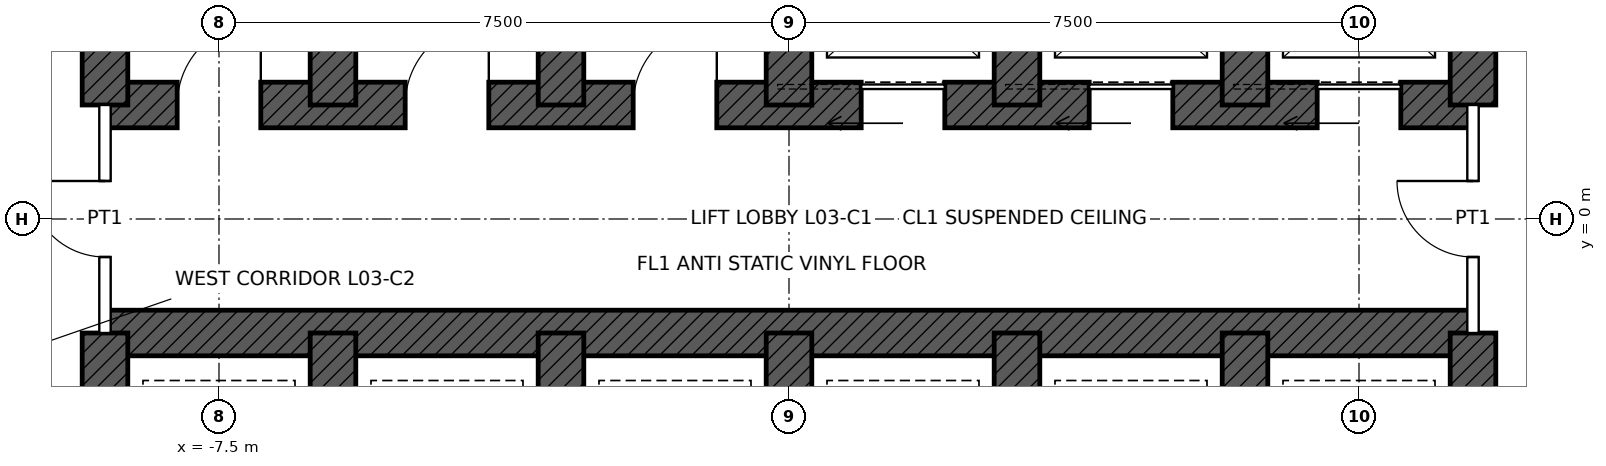
"""IFC4 building model, lengths in metres.
Left out: names, types, materials, properties, quantities, classifications, styles, units other than length and angle.
Written with IfcOpenShell. Run it as: python <this file> out.ifc"""

import sys

from ifc_helpers import new_model, si_unit, direction, frame, frame_2d, origin, place, context, subcontext, project, spatial, rectangle, extrude, element, fill, save


model = new_model("IFC4")
c1 = context("Model", 3, precision=1e-05, world=origin(), true_north=direction((0.0, 1.0)))
c2 = subcontext(c1, "Body", "Model", "MODEL_VIEW")
j1 = project(units=[si_unit("LENGTHUNIT", "METRE"), si_unit("PLANEANGLEUNIT", "RADIAN")], contexts=[c1])
p1 = place(None, origin())
s1 = spatial("IfcSite", under=j1, at=p1, CompositionType="ELEMENT")
p2 = place(p1, origin())
s2 = spatial("IfcBuilding", under=s1, at=p2, CompositionType="ELEMENT")
p3 = place(p2, frame((0.0, 0.0, 18.0)))
s3 = spatial("IfcBuildingStorey", under=s2, at=p3, CompositionType="ELEMENT", Elevation=18.0)
p4 = place(p3, frame((-9.0, 1.5, 0.0), z_axis=(0.0, 0.0, 1.0), x_axis=(1.0, 0.0, 0.0)))
e1 = element("IfcWall", 1, at=p4, inside=s3, PredefinedType="SHEAR", context=c2, shape_type="SweptSolid", body=[
    extrude(rectangle(XDim=18.0, YDim=0.6, at=frame_2d((9.0, 0.0))), origin(), (0.0, 0.0, 1.0), 5.4),
])
p5 = place(p4, frame((9.95, 0.0, 0.0)))
e2 = element("IfcOpeningElement", 2, at=p5, cuts=e1, PredefinedType="OPENING", context=c2, shape_type="SweptSolid", body=[
    extrude(rectangle(XDim=1.1, YDim=2.1, at=frame_2d((0.55, 1.05))), frame((0.0, 0.31, 0.0), z_axis=(0.0, -1.0, 0.0), x_axis=(1.0, 0.0, 0.0)), (0.0, 0.0, 1.0), 0.62),
])
p6 = place(p4, frame((12.95, 0.0, 0.0)))
e3 = element("IfcOpeningElement", 3, at=p6, cuts=e1, PredefinedType="OPENING", context=c2, shape_type="SweptSolid", body=[
    extrude(rectangle(XDim=1.1, YDim=2.1, at=frame_2d((0.55, 1.05))), frame((0.0, 0.31, 0.0), z_axis=(0.0, -1.0, 0.0), x_axis=(1.0, 0.0, 0.0)), (0.0, 0.0, 1.0), 0.62),
])
p7 = place(p4, frame((15.95, 0.0, 0.0)))
e4 = element("IfcOpeningElement", 4, at=p7, cuts=e1, PredefinedType="OPENING", context=c2, shape_type="SweptSolid", body=[
    extrude(rectangle(XDim=1.1, YDim=2.1, at=frame_2d((0.55, 1.05))), frame((0.0, 0.31, 0.0), z_axis=(0.0, -1.0, 0.0), x_axis=(1.0, 0.0, 0.0)), (0.0, 0.0, 1.0), 0.62),
])
p8 = place(p4, frame((0.95, 0.0, 0.0)))
e5 = element("IfcOpeningElement", 5, at=p8, cuts=e1, PredefinedType="OPENING", context=c2, shape_type="SweptSolid", body=[
    extrude(rectangle(XDim=1.1, YDim=2.1, at=frame_2d((0.55, 1.05))), frame((0.0, 0.31, 0.0), z_axis=(0.0, -1.0, 0.0), x_axis=(1.0, 0.0, 0.0)), (0.0, 0.0, 1.0), 0.62),
])
p9 = place(p4, frame((3.95, 0.0, 0.0)))
e6 = element("IfcOpeningElement", 6, at=p9, cuts=e1, PredefinedType="OPENING", context=c2, shape_type="SweptSolid", body=[
    extrude(rectangle(XDim=1.1, YDim=2.1, at=frame_2d((0.55, 1.05))), frame((0.0, 0.31, 0.0), z_axis=(0.0, -1.0, 0.0), x_axis=(1.0, 0.0, 0.0)), (0.0, 0.0, 1.0), 0.62),
])
p10 = place(p4, frame((6.95, 0.0, 0.0)))
e7 = element("IfcOpeningElement", 7, at=p10, cuts=e1, PredefinedType="OPENING", context=c2, shape_type="SweptSolid", body=[
    extrude(rectangle(XDim=1.1, YDim=2.1, at=frame_2d((0.55, 1.05))), frame((0.0, 0.31, 0.0), z_axis=(0.0, -1.0, 0.0), x_axis=(1.0, 0.0, 0.0)), (0.0, 0.0, 1.0), 0.62),
])
p11 = place(p3, frame((-9.0, -1.5, 0.0), z_axis=(0.0, 0.0, 1.0), x_axis=(1.0, 0.0, 0.0)))
e8 = element("IfcWall", 8, at=p11, inside=s3, PredefinedType="SHEAR", context=c2, shape_type="SweptSolid", body=[
    extrude(rectangle(XDim=18.0, YDim=0.6, at=frame_2d((9.0, 0.0))), origin(), (0.0, 0.0, 1.0), 5.4),
])
for number, where, z_axis, x_axis in (
    (9, (-9.0, 1.5, 0.0), (0.0, 0.0, 1.0), (0.0, 1.0, 0.0)),
    (10, (9.0, 1.5, 0.0), (0.0, 0.0, 1.0), (0.0, 1.0, 0.0)),
    (11, (-9.0, -4.5, 0.0), (0.0, 0.0, 1.0), (0.0, 1.0, 0.0)),
    (12, (9.0, -4.5, 0.0), (0.0, 0.0, 1.0), (0.0, 1.0, 0.0)),
    (13, (-6.0, 1.5, 0.0), (0.0, 0.0, 1.0), (0.0, 1.0, 0.0)),
    (14, (-3.0, 1.5, 0.0), (0.0, 0.0, 1.0), (0.0, 1.0, 0.0)),
    (15, (0.0, 1.5, 0.0), (0.0, 0.0, 1.0), (0.0, 1.0, 0.0)),
    (16, (3.0, 1.5, 0.0), (0.0, 0.0, 1.0), (0.0, 1.0, 0.0)),
    (17, (6.0, 1.5, 0.0), (0.0, 0.0, 1.0), (0.0, 1.0, 0.0)),
    (18, (-6.0, -4.5, 0.0), (0.0, 0.0, 1.0), (0.0, 1.0, 0.0)),
    (19, (-3.0, -4.5, 0.0), (0.0, 0.0, 1.0), (0.0, 1.0, 0.0)),
    (20, (0.0, -4.5, 0.0), (0.0, 0.0, 1.0), (0.0, 1.0, 0.0)),
    (21, (3.0, -4.5, 0.0), (0.0, 0.0, 1.0), (0.0, 1.0, 0.0)),
    (22, (6.0, -4.5, 0.0), (0.0, 0.0, 1.0), (0.0, 1.0, 0.0)),
):
    element("IfcWall", number, at=place(p3, frame(where, z_axis=z_axis, x_axis=x_axis)), inside=s3, PredefinedType="SHEAR", context=c2, shape_type="SweptSolid", body=[
        extrude(rectangle(XDim=3.0, YDim=0.6, at=frame_2d((1.5, 0.0))), origin(), (0.0, 0.0, 1.0), 5.4),
    ])
p12 = place(p3, frame((-9.0, -1.5, 0.0), z_axis=(0.0, 0.0, 1.0), x_axis=(0.0, 1.0, 0.0)))
e23 = element("IfcWall", 23, at=p12, inside=s3, PredefinedType="PARTITIONING", context=c2, shape_type="SweptSolid", body=[
    extrude(rectangle(XDim=3.0, YDim=0.15, at=frame_2d((1.5, 0.0))), origin(), (0.0, 0.0, 1.0), 5.15),
])
p13 = place(p12, frame((1.0, 0.0, 0.0)))
e24 = element("IfcOpeningElement", 24, at=p13, cuts=e23, PredefinedType="OPENING", context=c2, shape_type="SweptSolid", body=[
    extrude(rectangle(XDim=1.0, YDim=2.4, at=frame_2d((0.5, 1.2))), frame((0.0, 0.085, 0.0), z_axis=(0.0, -1.0, 0.0), x_axis=(1.0, 0.0, 0.0)), (0.0, 0.0, 1.0), 0.17),
])
p14 = place(p3, frame((9.0, -1.5, 0.0), z_axis=(0.0, 0.0, 1.0), x_axis=(0.0, 1.0, 0.0)))
e25 = element("IfcWall", 25, at=p14, inside=s3, PredefinedType="PARTITIONING", context=c2, shape_type="SweptSolid", body=[
    extrude(rectangle(XDim=3.0, YDim=0.15, at=frame_2d((1.5, 0.0))), origin(), (0.0, 0.0, 1.0), 5.15),
])
p15 = place(p14, frame((1.0, 0.0, 0.0)))
e26 = element("IfcOpeningElement", 26, at=p15, cuts=e25, PredefinedType="OPENING", context=c2, shape_type="SweptSolid", body=[
    extrude(rectangle(XDim=1.0, YDim=2.4, at=frame_2d((0.5, 1.2))), frame((0.0, 0.085, 0.0), z_axis=(0.0, -1.0, 0.0), x_axis=(1.0, 0.0, 0.0)), (0.0, 0.0, 1.0), 0.17),
])
p16 = place(p5, origin())
e27 = element("IfcDoor", 27, at=p16, inside=s3, OperationType="SLIDING_TO_LEFT", PredefinedType="DOOR", context=c2, shape_type="SweptSolid", body=[
    extrude(rectangle(XDim=1.1, YDim=2.1, at=frame_2d((0.55, 1.05))), frame((0.0, 0.025, 0.0), z_axis=(0.0, -1.0, 0.0), x_axis=(1.0, 0.0, 0.0)), (0.0, 0.0, 1.0), 0.05),
])
fill(e2, e27)
p17 = place(p6, origin())
e28 = element("IfcDoor", 28, at=p17, inside=s3, OperationType="SLIDING_TO_LEFT", PredefinedType="DOOR", context=c2, shape_type="SweptSolid", body=[
    extrude(rectangle(XDim=1.1, YDim=2.1, at=frame_2d((0.55, 1.05))), frame((0.0, 0.025, 0.0), z_axis=(0.0, -1.0, 0.0), x_axis=(1.0, 0.0, 0.0)), (0.0, 0.0, 1.0), 0.05),
])
fill(e3, e28)
p18 = place(p7, origin())
e29 = element("IfcDoor", 29, at=p18, inside=s3, OperationType="SLIDING_TO_LEFT", PredefinedType="DOOR", context=c2, shape_type="SweptSolid", body=[
    extrude(rectangle(XDim=1.1, YDim=2.1, at=frame_2d((0.55, 1.05))), frame((0.0, 0.025, 0.0), z_axis=(0.0, -1.0, 0.0), x_axis=(1.0, 0.0, 0.0)), (0.0, 0.0, 1.0), 0.05),
])
fill(e4, e29)
p19 = place(p13, origin())
e30 = element("IfcDoor", 30, at=p19, inside=s3, OperationType="SINGLE_SWING_RIGHT", PredefinedType="DOOR", context=c2, shape_type="SweptSolid", body=[
    extrude(rectangle(XDim=1.0, YDim=2.4, at=frame_2d((0.5, 1.2))), frame((0.0, 0.025, 0.0), z_axis=(0.0, -1.0, 0.0), x_axis=(1.0, 0.0, 0.0)), (0.0, 0.0, 1.0), 0.05),
])
fill(e24, e30)
p20 = place(p15, origin())
e31 = element("IfcDoor", 31, at=p20, inside=s3, OperationType="SINGLE_SWING_RIGHT", PredefinedType="DOOR", context=c2, shape_type="SweptSolid", body=[
    extrude(rectangle(XDim=1.0, YDim=2.4, at=frame_2d((0.5, 1.2))), frame((0.0, 0.025, 0.0), z_axis=(0.0, -1.0, 0.0), x_axis=(1.0, 0.0, 0.0)), (0.0, 0.0, 1.0), 0.05),
])
fill(e26, e31)
p21 = place(p8, origin())
e32 = element("IfcDoor", 32, at=p21, inside=s3, OperationType="SINGLE_SWING_RIGHT", PredefinedType="DOOR", context=c2, shape_type="SweptSolid", body=[
    extrude(rectangle(XDim=1.1, YDim=2.1, at=frame_2d((0.55, 1.05))), frame((0.0, 0.025, 0.0), z_axis=(0.0, -1.0, 0.0), x_axis=(1.0, 0.0, 0.0)), (0.0, 0.0, 1.0), 0.05),
])
fill(e5, e32)
p22 = place(p9, origin())
e33 = element("IfcDoor", 33, at=p22, inside=s3, OperationType="SINGLE_SWING_RIGHT", PredefinedType="DOOR", context=c2, shape_type="SweptSolid", body=[
    extrude(rectangle(XDim=1.1, YDim=2.1, at=frame_2d((0.55, 1.05))), frame((0.0, 0.025, 0.0), z_axis=(0.0, -1.0, 0.0), x_axis=(1.0, 0.0, 0.0)), (0.0, 0.0, 1.0), 0.05),
])
fill(e6, e33)
p23 = place(p10, origin())
e34 = element("IfcDoor", 34, at=p23, inside=s3, OperationType="SINGLE_SWING_RIGHT", PredefinedType="DOOR", context=c2, shape_type="SweptSolid", body=[
    extrude(rectangle(XDim=1.1, YDim=2.1, at=frame_2d((0.55, 1.05))), frame((0.0, 0.025, 0.0), z_axis=(0.0, -1.0, 0.0), x_axis=(1.0, 0.0, 0.0)), (0.0, 0.0, 1.0), 0.05),
])
fill(e7, e34)
save(model, sys.argv[1])
